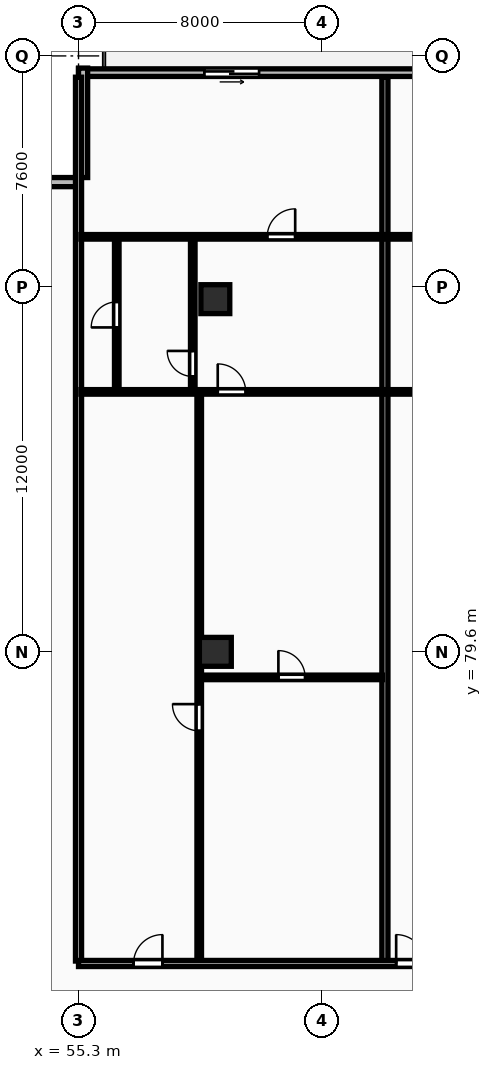
"""IFC4 building model, lengths in metres.
Left out: names, types, materials, properties, quantities, classifications, styles, units other than length and angle.
Written with IfcOpenShell. Run it as: python <this file> out.ifc"""

import sys

from ifc_helpers import new_model, si_unit, direction, frame, frame_2d, origin, origin_2d, place, context, subcontext, project, spatial, rectangle, circle, extrude, element, fill, save


model = new_model("IFC4")
c1 = context("Model", 3, precision=1e-05, world=origin(), true_north=direction((0.0, 1.0)))
c2 = subcontext(c1, "Body", "Model", "MODEL_VIEW")
j1 = project(units=[si_unit("LENGTHUNIT", "METRE"), si_unit("PLANEANGLEUNIT", "RADIAN")], contexts=[c1])
p1 = place(None, origin())
s1 = spatial("IfcSite", under=j1, at=p1, CompositionType="ELEMENT")
p2 = place(p1, origin())
s2 = spatial("IfcBuilding", under=s1, at=p2, CompositionType="ELEMENT")
p3 = place(p2, frame((0.0, 0.0, 24.0)))
s3 = spatial("IfcBuildingStorey", under=s2, at=p3, CompositionType="ELEMENT", Elevation=24.0)
p4 = place(p3, frame((59.8, 79.6, 0.0), z_axis=(0.0, 0.0, 1.0), x_axis=(1.0, 0.0, 0.0)))
e1 = element("IfcColumn", 1, at=p4, inside=s3, PredefinedType="COLUMN", context=c2, shape_type="SweptSolid", body=[
    extrude(rectangle(XDim=1.05, YDim=0.95, at=origin_2d()), origin(), (0.0, 0.0, 1.0), 3.25),
])
p5 = place(p3, frame((59.8, 91.2, 0.0), z_axis=(0.0, 0.0, 1.0), x_axis=(1.0, 0.0, 0.0)))
e2 = element("IfcColumn", 2, at=p5, inside=s3, PredefinedType="COLUMN", context=c2, shape_type="SweptSolid", body=[
    extrude(circle(Radius=0.475, at=origin_2d()), origin(), (0.0, 0.0, 1.0), 3.25),
])
p6 = place(p3, frame((132.9, 98.65, 0.0), z_axis=(0.0, 0.0, 1.0), x_axis=(-1.0, 0.0, 0.0)))
e3 = element("IfcWall", 3, at=p6, inside=s3, PredefinedType="STANDARD", context=c2, shape_type="SweptSolid", body=[
    extrude(rectangle(XDim=77.6, YDim=0.25, at=frame_2d((38.8, 0.0))), origin(), (0.0, 0.0, 1.0), 2.97),
])
p7 = place(p6, frame((71.661, 0.0, 0.0)))
e4 = element("IfcOpeningElement", 4, at=p7, cuts=e3, PredefinedType="OPENING", context=c2, shape_type="SweptSolid", body=[
    extrude(rectangle(XDim=1.8, YDim=2.2, at=frame_2d((0.9, 1.1))), frame((0.0, 0.135, 0.0), z_axis=(0.0, -1.0, 0.0), x_axis=(1.0, 0.0, 0.0)), (0.0, 0.0, 1.0), 0.27),
])
p8 = place(p6, frame((61.079, 0.0, 0.0)))
e5 = element("IfcOpeningElement", 5, at=p8, cuts=e3, PredefinedType="OPENING", context=c2, shape_type="SweptSolid", body=[
    extrude(rectangle(XDim=1.8, YDim=2.2, at=frame_2d((0.9, 1.1))), frame((0.0, 0.135, 0.0), z_axis=(0.0, -1.0, 0.0), x_axis=(1.0, 0.0, 0.0)), (0.0, 0.0, 1.0), 0.27),
])
p9 = place(p6, frame((50.498, 0.0, 0.0)))
e6 = element("IfcOpeningElement", 6, at=p9, cuts=e3, PredefinedType="OPENING", context=c2, shape_type="SweptSolid", body=[
    extrude(rectangle(XDim=1.8, YDim=2.2, at=frame_2d((0.9, 1.1))), frame((0.0, 0.135, 0.0), z_axis=(0.0, -1.0, 0.0), x_axis=(1.0, 0.0, 0.0)), (0.0, 0.0, 1.0), 0.27),
])
p10 = place(p6, frame((39.412, 0.0, 0.0)))
e7 = element("IfcOpeningElement", 7, at=p10, cuts=e3, PredefinedType="OPENING", context=c2, shape_type="SweptSolid", body=[
    extrude(rectangle(XDim=1.8, YDim=2.2, at=frame_2d((0.9, 1.1))), frame((0.0, 0.135, 0.0), z_axis=(0.0, -1.0, 0.0), x_axis=(1.0, 0.0, 0.0)), (0.0, 0.0, 1.0), 0.27),
])
p11 = place(p6, frame((28.326, 0.0, 0.0)))
e8 = element("IfcOpeningElement", 8, at=p11, cuts=e3, PredefinedType="OPENING", context=c2, shape_type="SweptSolid", body=[
    extrude(rectangle(XDim=1.8, YDim=2.2, at=frame_2d((0.9, 1.1))), frame((0.0, 0.135, 0.0), z_axis=(0.0, -1.0, 0.0), x_axis=(1.0, 0.0, 0.0)), (0.0, 0.0, 1.0), 0.27),
])
p12 = place(p6, frame((17.744, 0.0, 0.0)))
e9 = element("IfcOpeningElement", 9, at=p12, cuts=e3, PredefinedType="OPENING", context=c2, shape_type="SweptSolid", body=[
    extrude(rectangle(XDim=1.8, YDim=2.2, at=frame_2d((0.9, 1.1))), frame((0.0, 0.135, 0.0), z_axis=(0.0, -1.0, 0.0), x_axis=(1.0, 0.0, 0.0)), (0.0, 0.0, 1.0), 0.27),
])
p13 = place(p6, frame((6.901, 0.0, 0.0)))
e10 = element("IfcOpeningElement", 10, at=p13, cuts=e3, PredefinedType="OPENING", context=c2, shape_type="SweptSolid", body=[
    extrude(rectangle(XDim=1.8, YDim=2.2, at=frame_2d((0.9, 1.1))), frame((0.0, 0.135, 0.0), z_axis=(0.0, -1.0, 0.0), x_axis=(1.0, 0.0, 0.0)), (0.0, 0.0, 1.0), 0.27),
])
p14 = place(p6, frame((0.6, 0.0, 0.85)))
e11 = element("IfcOpeningElement", 11, at=p14, cuts=e3, PredefinedType="OPENING", context=c2, shape_type="SweptSolid", body=[
    extrude(rectangle(XDim=1.8, YDim=1.8, at=frame_2d((0.9, 0.9))), frame((0.0, 0.135, 0.0), z_axis=(0.0, -1.0, 0.0), x_axis=(1.0, 0.0, 0.0)), (0.0, 0.0, 1.0), 0.27),
])
for number, where, z_axis, x_axis in (
    (12, (55.45, 98.8, 0.0), (0.0, 0.0, 1.0), (0.0, -1.0, 0.0)),
    (13, (55.3, 95.05, 0.0), (0.0, 0.0, 1.0), (-1.0, 0.0, 0.0)),
):
    element("IfcWall", number, at=place(p3, frame(where, z_axis=z_axis, x_axis=x_axis)), inside=s3, PredefinedType="STANDARD", context=c2, shape_type="SweptSolid", body=[
        extrude(rectangle(XDim=3.6, YDim=0.3, at=frame_2d((1.8, 0.0))), origin(), (0.0, 0.0, 1.0), 2.97),
    ])
for number, where, z_axis, x_axis in (
    (14, (55.3, 69.43, 0.0), (0.0, 0.0, 1.0), (0.0, 1.0, 0.0)),
    (15, (65.378, 69.43, 0.0), (0.0, 0.0, 1.0), (0.0, 1.0, 0.0)),
):
    element("IfcWall", number, at=place(p3, frame(where, z_axis=z_axis, x_axis=x_axis)), inside=s3, PredefinedType="PARTITIONING", context=c2, shape_type="SweptSolid", body=[
        extrude(rectangle(XDim=29.07, YDim=0.2, at=frame_2d((14.535, 0.0))), origin(), (0.0, 0.0, 1.0), 2.97),
    ])
p15 = place(p3, frame((59.33, 78.76, 0.0), z_axis=(0.0, 0.0, 1.0), x_axis=(1.0, 0.0, 0.0)))
e16 = element("IfcWall", 16, at=p15, inside=s3, PredefinedType="PARTITIONING", context=c2, shape_type="SweptSolid", body=[
    extrude(rectangle(XDim=5.968, YDim=0.15, at=frame_2d((2.984, 0.0))), origin(), (0.0, 0.0, 1.0), 2.97),
])
p16 = place(p15, frame((2.544, 0.0, 0.0)))
e17 = element("IfcOpeningElement", 17, at=p16, cuts=e16, PredefinedType="OPENING", context=c2, shape_type="SweptSolid", body=[
    extrude(rectangle(XDim=0.88, YDim=2.06, at=frame_2d((0.44, 1.03))), frame((0.0, 0.085, 0.0), z_axis=(0.0, -1.0, 0.0), x_axis=(1.0, 0.0, 0.0)), (0.0, 0.0, 1.0), 0.17),
])
p17 = place(p3, frame((59.27, 69.41, 0.0), z_axis=(0.0, 0.0, 1.0), x_axis=(0.0, 1.0, 0.0)))
e18 = element("IfcWall", 18, at=p17, inside=s3, PredefinedType="PARTITIONING", context=c2, shape_type="SweptSolid", body=[
    extrude(rectangle(XDim=18.7, YDim=0.15, at=frame_2d((9.35, 0.0))), origin(), (0.0, 0.0, 1.0), 2.97),
])
p18 = place(p17, frame((7.59, 0.0, 0.0)))
e19 = element("IfcOpeningElement", 19, at=p18, cuts=e18, PredefinedType="OPENING", context=c2, shape_type="SweptSolid", body=[
    extrude(rectangle(XDim=0.88, YDim=2.06, at=frame_2d((0.44, 1.03))), frame((0.0, 0.085, 0.0), z_axis=(0.0, -1.0, 0.0), x_axis=(1.0, 0.0, 0.0)), (0.0, 0.0, 1.0), 0.17),
])
p19 = place(p3, frame((56.558, 88.19, 0.0), z_axis=(0.0, 0.0, 1.0), x_axis=(0.0, 1.0, 0.0)))
e20 = element("IfcWall", 20, at=p19, inside=s3, PredefinedType="PARTITIONING", context=c2, shape_type="SweptSolid", body=[
    extrude(rectangle(XDim=5.0, YDim=0.15, at=frame_2d((2.5, 0.0))), origin(), (0.0, 0.0, 1.0), 2.97),
])
p20 = place(p19, frame((2.08, 0.0, 0.0)))
e21 = element("IfcOpeningElement", 21, at=p20, cuts=e20, PredefinedType="OPENING", context=c2, shape_type="SweptSolid", body=[
    extrude(rectangle(XDim=0.84, YDim=2.04, at=frame_2d((0.42, 1.02))), frame((0.0, 0.085, 0.0), z_axis=(0.0, -1.0, 0.0), x_axis=(1.0, 0.0, 0.0)), (0.0, 0.0, 1.0), 0.17),
])
p21 = place(p3, frame((59.058, 88.19, 0.0), z_axis=(0.0, 0.0, 1.0), x_axis=(0.0, 1.0, 0.0)))
e22 = element("IfcWall", 22, at=p21, inside=s3, PredefinedType="PARTITIONING", context=c2, shape_type="SweptSolid", body=[
    extrude(rectangle(XDim=5.0, YDim=0.15, at=frame_2d((2.5, 0.0))), origin(), (0.0, 0.0, 1.0), 2.97),
])
p22 = place(p21, frame((0.467, 0.0, 0.0)))
e23 = element("IfcOpeningElement", 23, at=p22, cuts=e22, PredefinedType="OPENING", context=c2, shape_type="SweptSolid", body=[
    extrude(rectangle(XDim=0.84, YDim=2.04, at=frame_2d((0.42, 1.02))), frame((0.0, 0.085, 0.0), z_axis=(0.0, -1.0, 0.0), x_axis=(1.0, 0.0, 0.0)), (0.0, 0.0, 1.0), 0.17),
])
p23 = place(p3, frame((55.38, 88.15, 0.0), z_axis=(0.0, 0.0, 1.0), x_axis=(1.0, 0.0, 0.0)))
e24 = element("IfcWall", 24, at=p23, inside=s3, PredefinedType="PARTITIONING", context=c2, shape_type="SweptSolid", body=[
    extrude(rectangle(XDim=9.918, YDim=0.15, at=frame_2d((4.959, 0.0))), origin(), (0.0, 0.0, 1.0), 2.97),
])
p24 = place(p23, frame((4.499, 0.0, 0.0)))
e25 = element("IfcOpeningElement", 25, at=p24, cuts=e24, PredefinedType="OPENING", context=c2, shape_type="SweptSolid", body=[
    extrude(rectangle(XDim=0.92, YDim=2.08, at=frame_2d((0.46, 1.04))), frame((0.0, 0.085, 0.0), z_axis=(0.0, -1.0, 0.0), x_axis=(1.0, 0.0, 0.0)), (0.0, 0.0, 1.0), 0.17),
])
p25 = place(p3, frame((55.38, 93.25, 0.0), z_axis=(0.0, 0.0, 1.0), x_axis=(1.0, 0.0, 0.0)))
e26 = element("IfcWall", 26, at=p25, inside=s3, PredefinedType="PARTITIONING", context=c2, shape_type="SweptSolid", body=[
    extrude(rectangle(XDim=9.918, YDim=0.15, at=frame_2d((4.959, 0.0))), origin(), (0.0, 0.0, 1.0), 2.97),
])
p26 = place(p25, frame((6.127, 0.0, 0.0)))
e27 = element("IfcOpeningElement", 27, at=p26, cuts=e26, PredefinedType="OPENING", context=c2, shape_type="SweptSolid", body=[
    extrude(rectangle(XDim=0.92, YDim=2.08, at=frame_2d((0.46, 1.04))), frame((0.0, 0.085, 0.0), z_axis=(0.0, -1.0, 0.0), x_axis=(1.0, 0.0, 0.0)), (0.0, 0.0, 1.0), 0.17),
])
p27 = place(p3, frame((65.458, 88.15, 0.0), z_axis=(0.0, 0.0, 1.0), x_axis=(1.0, 0.0, 0.0)))
e28 = element("IfcWall", 28, at=p27, inside=s3, PredefinedType="PARTITIONING", context=c2, shape_type="SweptSolid", body=[
    extrude(rectangle(XDim=10.926, YDim=0.15, at=frame_2d((5.463, 0.0))), origin(), (0.0, 0.0, 1.0), 2.97),
])
p28 = place(p27, frame((5.003, 0.0, 0.0)))
e29 = element("IfcOpeningElement", 29, at=p28, cuts=e28, PredefinedType="OPENING", context=c2, shape_type="SweptSolid", body=[
    extrude(rectangle(XDim=0.92, YDim=2.08, at=frame_2d((0.46, 1.04))), frame((0.0, 0.085, 0.0), z_axis=(0.0, -1.0, 0.0), x_axis=(1.0, 0.0, 0.0)), (0.0, 0.0, 1.0), 0.17),
])
p29 = place(p3, frame((65.458, 93.25, 0.0), z_axis=(0.0, 0.0, 1.0), x_axis=(1.0, 0.0, 0.0)))
e30 = element("IfcWall", 30, at=p29, inside=s3, PredefinedType="PARTITIONING", context=c2, shape_type="SweptSolid", body=[
    extrude(rectangle(XDim=10.926, YDim=0.15, at=frame_2d((5.463, 0.0))), origin(), (0.0, 0.0, 1.0), 2.97),
])
p30 = place(p29, frame((5.003, 0.0, 0.0)))
e31 = element("IfcOpeningElement", 31, at=p30, cuts=e30, PredefinedType="OPENING", context=c2, shape_type="SweptSolid", body=[
    extrude(rectangle(XDim=0.92, YDim=2.08, at=frame_2d((0.46, 1.04))), frame((0.0, 0.085, 0.0), z_axis=(0.0, -1.0, 0.0), x_axis=(1.0, 0.0, 0.0)), (0.0, 0.0, 1.0), 0.17),
])
p31 = place(p3, frame((55.3, 69.35, 0.0), z_axis=(0.0, 0.0, 1.0), x_axis=(1.0, 0.0, 0.0)))
e32 = element("IfcWall", 32, at=p31, inside=s3, PredefinedType="PARTITIONING", context=c2, shape_type="SweptSolid", body=[
    extrude(rectangle(XDim=77.6, YDim=0.2, at=frame_2d((38.8, 0.0))), origin(), (0.0, 0.0, 1.0), 2.97),
])
p32 = place(p31, frame((1.81, 0.0, 0.0)))
e33 = element("IfcOpeningElement", 33, at=p32, cuts=e32, PredefinedType="OPENING", context=c2, shape_type="SweptSolid", body=[
    extrude(rectangle(XDim=0.95, YDim=2.15, at=frame_2d((0.475, 1.075))), frame((0.0, 0.11, 0.0), z_axis=(0.0, -1.0, 0.0), x_axis=(1.0, 0.0, 0.0)), (0.0, 0.0, 1.0), 0.22),
])
p33 = place(p31, frame((10.448, 0.0, 0.0)))
e34 = element("IfcOpeningElement", 34, at=p33, cuts=e32, PredefinedType="OPENING", context=c2, shape_type="SweptSolid", body=[
    extrude(rectangle(XDim=0.95, YDim=2.15, at=frame_2d((0.475, 1.075))), frame((0.0, 0.11, 0.0), z_axis=(0.0, -1.0, 0.0), x_axis=(1.0, 0.0, 0.0)), (0.0, 0.0, 1.0), 0.22),
])
p34 = place(p31, frame((23.208, 0.0, 0.0)))
e35 = element("IfcOpeningElement", 35, at=p34, cuts=e32, PredefinedType="OPENING", context=c2, shape_type="SweptSolid", body=[
    extrude(rectangle(XDim=0.95, YDim=2.15, at=frame_2d((0.475, 1.075))), frame((0.0, 0.11, 0.0), z_axis=(0.0, -1.0, 0.0), x_axis=(1.0, 0.0, 0.0)), (0.0, 0.0, 1.0), 0.22),
])
p35 = place(p31, frame((33.287, 0.0, 0.0)))
e36 = element("IfcOpeningElement", 36, at=p35, cuts=e32, PredefinedType="OPENING", context=c2, shape_type="SweptSolid", body=[
    extrude(rectangle(XDim=0.95, YDim=2.15, at=frame_2d((0.475, 1.075))), frame((0.0, 0.11, 0.0), z_axis=(0.0, -1.0, 0.0), x_axis=(1.0, 0.0, 0.0)), (0.0, 0.0, 1.0), 0.22),
])
p36 = place(p31, frame((44.905, 0.0, 0.0)))
e37 = element("IfcOpeningElement", 37, at=p36, cuts=e32, PredefinedType="OPENING", context=c2, shape_type="SweptSolid", body=[
    extrude(rectangle(XDim=0.95, YDim=2.15, at=frame_2d((0.475, 1.075))), frame((0.0, 0.11, 0.0), z_axis=(0.0, -1.0, 0.0), x_axis=(1.0, 0.0, 0.0)), (0.0, 0.0, 1.0), 0.22),
])
p37 = place(p31, frame((54.119, 0.0, 0.0)))
e38 = element("IfcOpeningElement", 38, at=p37, cuts=e32, PredefinedType="OPENING", context=c2, shape_type="SweptSolid", body=[
    extrude(rectangle(XDim=0.95, YDim=2.15, at=frame_2d((0.475, 1.075))), frame((0.0, 0.11, 0.0), z_axis=(0.0, -1.0, 0.0), x_axis=(1.0, 0.0, 0.0)), (0.0, 0.0, 1.0), 0.22),
])
p38 = place(p31, frame((66.74, 0.0, 0.0)))
e39 = element("IfcOpeningElement", 39, at=p38, cuts=e32, PredefinedType="OPENING", context=c2, shape_type="SweptSolid", body=[
    extrude(rectangle(XDim=0.95, YDim=2.15, at=frame_2d((0.475, 1.075))), frame((0.0, 0.11, 0.0), z_axis=(0.0, -1.0, 0.0), x_axis=(1.0, 0.0, 0.0)), (0.0, 0.0, 1.0), 0.22),
])
p39 = place(p7, origin())
e40 = element("IfcDoor", 40, at=p39, inside=s3, OperationType="SLIDING_TO_LEFT", PredefinedType="DOOR", context=c2, shape_type="SweptSolid", body=[
    extrude(rectangle(XDim=1.8, YDim=2.2, at=frame_2d((0.9, 1.1))), frame((0.0, 0.025, 0.0), z_axis=(0.0, -1.0, 0.0), x_axis=(1.0, 0.0, 0.0)), (0.0, 0.0, 1.0), 0.05),
])
fill(e4, e40)
p40 = place(p16, origin())
e41 = element("IfcDoor", 41, at=p40, inside=s3, OperationType="SINGLE_SWING_LEFT", PredefinedType="DOOR", context=c2, shape_type="SweptSolid", body=[
    extrude(rectangle(XDim=0.88, YDim=2.06, at=frame_2d((0.44, 1.03))), frame((0.0, 0.025, 0.0), z_axis=(0.0, -1.0, 0.0), x_axis=(1.0, 0.0, 0.0)), (0.0, 0.0, 1.0), 0.05),
])
fill(e17, e41)
p41 = place(p18, origin())
e42 = element("IfcDoor", 42, at=p41, inside=s3, OperationType="SINGLE_SWING_RIGHT", PredefinedType="DOOR", context=c2, shape_type="SweptSolid", body=[
    extrude(rectangle(XDim=0.88, YDim=2.06, at=frame_2d((0.44, 1.03))), frame((0.0, 0.025, 0.0), z_axis=(0.0, -1.0, 0.0), x_axis=(1.0, 0.0, 0.0)), (0.0, 0.0, 1.0), 0.05),
])
fill(e19, e42)
p42 = place(p20, origin())
e43 = element("IfcDoor", 43, at=p42, inside=s3, OperationType="SINGLE_SWING_LEFT", PredefinedType="DOOR", context=c2, shape_type="SweptSolid", body=[
    extrude(rectangle(XDim=0.84, YDim=2.04, at=frame_2d((0.42, 1.02))), frame((0.0, 0.025, 0.0), z_axis=(0.0, -1.0, 0.0), x_axis=(1.0, 0.0, 0.0)), (0.0, 0.0, 1.0), 0.05),
])
fill(e21, e43)
p43 = place(p22, origin())
e44 = element("IfcDoor", 44, at=p43, inside=s3, OperationType="SINGLE_SWING_RIGHT", PredefinedType="DOOR", context=c2, shape_type="SweptSolid", body=[
    extrude(rectangle(XDim=0.84, YDim=2.04, at=frame_2d((0.42, 1.02))), frame((0.0, 0.025, 0.0), z_axis=(0.0, -1.0, 0.0), x_axis=(1.0, 0.0, 0.0)), (0.0, 0.0, 1.0), 0.05),
])
fill(e23, e44)
p44 = place(p24, origin())
e45 = element("IfcDoor", 45, at=p44, inside=s3, OperationType="SINGLE_SWING_LEFT", PredefinedType="DOOR", context=c2, shape_type="SweptSolid", body=[
    extrude(rectangle(XDim=0.92, YDim=2.08, at=frame_2d((0.46, 1.04))), frame((0.0, 0.025, 0.0), z_axis=(0.0, -1.0, 0.0), x_axis=(1.0, 0.0, 0.0)), (0.0, 0.0, 1.0), 0.05),
])
fill(e25, e45)
p45 = place(p26, origin())
e46 = element("IfcDoor", 46, at=p45, inside=s3, OperationType="SINGLE_SWING_RIGHT", PredefinedType="DOOR", context=c2, shape_type="SweptSolid", body=[
    extrude(rectangle(XDim=0.92, YDim=2.08, at=frame_2d((0.46, 1.04))), frame((0.0, 0.025, 0.0), z_axis=(0.0, -1.0, 0.0), x_axis=(1.0, 0.0, 0.0)), (0.0, 0.0, 1.0), 0.05),
])
fill(e27, e46)
p46 = place(p32, origin())
e47 = element("IfcDoor", 47, at=p46, inside=s3, OperationType="SINGLE_SWING_RIGHT", PredefinedType="DOOR", context=c2, shape_type="SweptSolid", body=[
    extrude(rectangle(XDim=0.95, YDim=2.15, at=frame_2d((0.475, 1.075))), frame((0.0, 0.025, 0.0), z_axis=(0.0, -1.0, 0.0), x_axis=(1.0, 0.0, 0.0)), (0.0, 0.0, 1.0), 0.05),
])
fill(e33, e47)
p47 = place(p33, origin())
e48 = element("IfcDoor", 48, at=p47, inside=s3, OperationType="SINGLE_SWING_LEFT", PredefinedType="DOOR", context=c2, shape_type="SweptSolid", body=[
    extrude(rectangle(XDim=0.95, YDim=2.15, at=frame_2d((0.475, 1.075))), frame((0.0, 0.025, 0.0), z_axis=(0.0, -1.0, 0.0), x_axis=(1.0, 0.0, 0.0)), (0.0, 0.0, 1.0), 0.05),
])
fill(e34, e48)
save(model, sys.argv[1])
